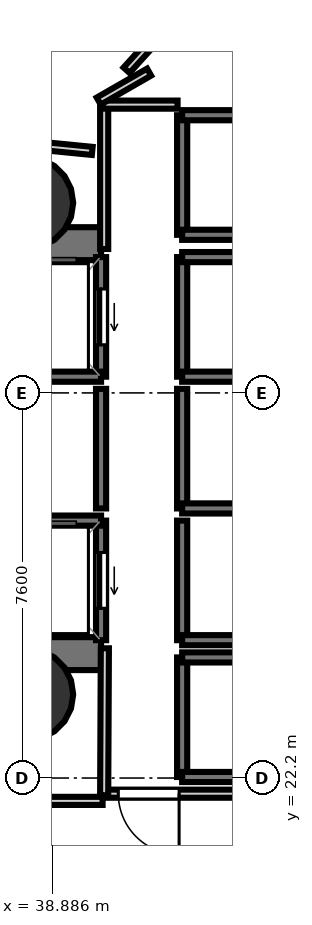
"""IFC4 building model, lengths in metres.
Left out: names, types, materials, properties, quantities, classifications, styles, units other than length and angle.
Written with IfcOpenShell. Run it as: python <this file> out.ifc"""

import sys

from ifc_helpers import new_model, si_unit, direction, frame, frame_2d, origin, origin_2d, place, context, subcontext, project, spatial, rectangle, hollow_circle, extrude, element, fill, save


model = new_model("IFC4")
c1 = context("Model", 3, precision=1e-05, world=origin(), true_north=direction((0.0, 1.0)))
c2 = subcontext(c1, "Body", "Model", "MODEL_VIEW")
j1 = project(units=[si_unit("LENGTHUNIT", "METRE"), si_unit("PLANEANGLEUNIT", "RADIAN")], contexts=[c1])
p1 = place(None, origin())
s1 = spatial("IfcSite", under=j1, at=p1, CompositionType="ELEMENT")
p2 = place(p1, origin())
s2 = spatial("IfcBuilding", under=s1, at=p2, CompositionType="ELEMENT")
p3 = place(p2, frame((0.0, 0.0, -10.0)))
s3 = spatial("IfcBuildingStorey", under=s2, at=p3, CompositionType="ELEMENT", Elevation=-10.0)
p4 = place(p3, frame((29.13, 32.745, 0.0), z_axis=(0.0, 0.0, 1.0), x_axis=(1.0, 0.0, 0.0)))
e1 = element("IfcWall", 1, at=p4, inside=s3, PredefinedType="SHEAR", context=c2, shape_type="SweptSolid", body=[
    extrude(rectangle(XDim=10.72, YDim=0.65, at=frame_2d((5.36, 0.0))), origin(), (0.0, 0.0, 1.0), 4.0),
])
p5 = place(p4, frame((1.095, 0.0, 0.0)))
e2 = element("IfcOpeningElement", 2, at=p5, cuts=e1, PredefinedType="OPENING", context=c2, shape_type="SweptSolid", body=[
    extrude(rectangle(XDim=1.25, YDim=2.15, at=frame_2d((0.625, 1.075))), frame((0.0, 0.335, 0.0), z_axis=(0.0, -1.0, 0.0), x_axis=(1.0, 0.0, 0.0)), (0.0, 0.0, 1.0), 0.67),
])
p6 = place(p3, frame((29.13, 24.655, 0.0), z_axis=(0.0, 0.0, 1.0), x_axis=(1.0, 0.0, 0.0)))
e3 = element("IfcWall", 3, at=p6, inside=s3, PredefinedType="SHEAR", context=c2, shape_type="SweptSolid", body=[
    extrude(rectangle(XDim=10.72, YDim=0.65, at=frame_2d((5.36, 0.0))), origin(), (0.0, 0.0, 1.0), 4.0),
])
p7 = place(p6, frame((0.895, 0.0, 0.0)))
e4 = element("IfcOpeningElement", 4, at=p7, cuts=e3, PredefinedType="OPENING", context=c2, shape_type="SweptSolid", body=[
    extrude(rectangle(XDim=1.25, YDim=2.15, at=frame_2d((0.625, 1.075))), frame((0.0, 0.335, 0.0), z_axis=(0.0, -1.0, 0.0), x_axis=(1.0, 0.0, 0.0)), (0.0, 0.0, 1.0), 0.67),
])
for number, where, z_axis, x_axis in (
    (5, (38.4, 33.55, 0.0), (0.0, 0.0, 1.0), (1.0, 0.0, 0.0)),
    (6, (38.4, 23.85, 0.0), (0.0, 0.0, 1.0), (1.0, 0.0, 0.0)),
):
    element("IfcColumn", number, at=place(p3, frame(where, z_axis=z_axis, x_axis=x_axis)), inside=s3, PredefinedType="COLUMN", context=c2, shape_type="SweptSolid", body=[
        extrude(hollow_circle(Radius=0.9, WallThickness=0.045, at=origin_2d()), origin(), (0.0, 0.0, 1.0), 4.4),
    ])
p8 = place(p3, frame((39.85, 30.12, 0.0), z_axis=(0.0, 0.0, 1.0), x_axis=(0.0, 1.0, 0.0)))
e7 = element("IfcWall", 7, at=p8, inside=s3, PredefinedType="SOLIDWALL", context=c2, shape_type="SweptSolid", body=[
    extrude(rectangle(XDim=2.36, YDim=0.2, at=frame_2d((1.18, 0.0))), origin(), (0.0, 0.0, 1.0), 4.0),
])
p9 = place(p8, frame((0.63, 0.0, 0.0)))
e8 = element("IfcOpeningElement", 8, at=p9, cuts=e7, PredefinedType="OPENING", context=c2, shape_type="SweptSolid", body=[
    extrude(rectangle(XDim=1.1, YDim=2.15, at=frame_2d((0.55, 1.075))), frame((0.0, 0.11, 0.0), z_axis=(0.0, -1.0, 0.0), x_axis=(1.0, 0.0, 0.0)), (0.0, 0.0, 1.0), 0.22),
])
p10 = place(p3, frame((37.75, 30.12, 0.0), z_axis=(0.0, 0.0, 1.0), x_axis=(1.0, 0.0, 0.0)))
e9 = element("IfcWall", 9, at=p10, inside=s3, PredefinedType="SOLIDWALL", context=c2, shape_type="SweptSolid", body=[
    extrude(rectangle(XDim=2.1, YDim=0.2, at=frame_2d((1.05, 0.0))), origin(), (0.0, 0.0, 1.0), 4.0),
])
p11 = place(p3, frame((39.85, 24.92, 0.0), z_axis=(0.0, 0.0, 1.0), x_axis=(0.0, 1.0, 0.0)))
e10 = element("IfcWall", 10, at=p11, inside=s3, PredefinedType="SOLIDWALL", context=c2, shape_type="SweptSolid", body=[
    extrude(rectangle(XDim=2.36, YDim=0.2, at=frame_2d((1.18, 0.0))), origin(), (0.0, 0.0, 1.0), 4.0),
])
p12 = place(p11, frame((0.63, 0.0, 0.0)))
e11 = element("IfcOpeningElement", 11, at=p12, cuts=e10, PredefinedType="OPENING", context=c2, shape_type="SweptSolid", body=[
    extrude(rectangle(XDim=1.1, YDim=2.15, at=frame_2d((0.55, 1.075))), frame((0.0, 0.11, 0.0), z_axis=(0.0, -1.0, 0.0), x_axis=(1.0, 0.0, 0.0)), (0.0, 0.0, 1.0), 0.22),
])
p13 = place(p3, frame((37.75, 27.28, 0.0), z_axis=(0.0, 0.0, 1.0), x_axis=(1.0, 0.0, 0.0)))
e12 = element("IfcWall", 12, at=p13, inside=s3, PredefinedType="SOLIDWALL", context=c2, shape_type="SweptSolid", body=[
    extrude(rectangle(XDim=2.1, YDim=0.2, at=frame_2d((1.05, 0.0))), origin(), (0.0, 0.0, 1.0), 4.0),
])
p14 = place(p3, frame((41.45, 30.12, 0.0), z_axis=(0.0, 0.0, 1.0), x_axis=(0.0, 1.0, 0.0)))
e13 = element("IfcWall", 13, at=p14, inside=s3, PredefinedType="SOLIDWALL", context=c2, shape_type="SweptSolid", body=[
    extrude(rectangle(XDim=2.36, YDim=0.2, at=frame_2d((1.18, 0.0))), origin(), (0.0, 0.0, 1.0), 4.0),
])
for number, where, z_axis, x_axis in (
    (14, (41.45, 32.48, 0.0), (0.0, 0.0, 1.0), (1.0, 0.0, 0.0)),
    (15, (41.45, 30.12, 0.0), (0.0, 0.0, 1.0), (1.0, 0.0, 0.0)),
):
    element("IfcWall", number, at=place(p3, frame(where, z_axis=z_axis, x_axis=x_axis)), inside=s3, PredefinedType="SOLIDWALL", context=c2, shape_type="SweptSolid", body=[
        extrude(rectangle(XDim=2.1, YDim=0.2, at=frame_2d((1.05, 0.0))), origin(), (0.0, 0.0, 1.0), 4.0),
    ])
p15 = place(p3, frame((41.45, 27.52, 0.0), z_axis=(0.0, 0.0, 1.0), x_axis=(0.0, 1.0, 0.0)))
e16 = element("IfcWall", 16, at=p15, inside=s3, PredefinedType="SOLIDWALL", context=c2, shape_type="SweptSolid", body=[
    extrude(rectangle(XDim=2.36, YDim=0.2, at=frame_2d((1.18, 0.0))), origin(), (0.0, 0.0, 1.0), 4.0),
])
p16 = place(p3, frame((41.45, 27.52, 0.0), z_axis=(0.0, 0.0, 1.0), x_axis=(1.0, 0.0, 0.0)))
e17 = element("IfcWall", 17, at=p16, inside=s3, PredefinedType="SOLIDWALL", context=c2, shape_type="SweptSolid", body=[
    extrude(rectangle(XDim=2.1, YDim=0.2, at=frame_2d((1.05, 0.0))), origin(), (0.0, 0.0, 1.0), 4.0),
])
p17 = place(p3, frame((41.45, 24.92, 0.0), z_axis=(0.0, 0.0, 1.0), x_axis=(0.0, 1.0, 0.0)))
e18 = element("IfcWall", 18, at=p17, inside=s3, PredefinedType="SOLIDWALL", context=c2, shape_type="SweptSolid", body=[
    extrude(rectangle(XDim=2.36, YDim=0.2, at=frame_2d((1.18, 0.0))), origin(), (0.0, 0.0, 1.0), 4.0),
])
p18 = place(p3, frame((41.45, 24.92, 0.0), z_axis=(0.0, 0.0, 1.0), x_axis=(1.0, 0.0, 0.0)))
e19 = element("IfcWall", 19, at=p18, inside=s3, PredefinedType="SOLIDWALL", context=c2, shape_type="SweptSolid", body=[
    extrude(rectangle(XDim=2.1, YDim=0.2, at=frame_2d((1.05, 0.0))), origin(), (0.0, 0.0, 1.0), 4.0),
])
p19 = place(p3, frame((39.85, 27.52, 0.0), z_axis=(0.0, 0.0, 1.0), x_axis=(0.0, 1.0, 0.0)))
e20 = element("IfcWall", 20, at=p19, inside=s3, PredefinedType="SOLIDWALL", context=c2, shape_type="SweptSolid", body=[
    extrude(rectangle(XDim=2.36, YDim=0.2, at=frame_2d((1.18, 0.0))), origin(), (0.0, 0.0, 1.0), 4.0),
])
p20 = place(p3, frame((41.45, 22.22, 0.0), z_axis=(0.0, 0.0, 1.0), x_axis=(0.0, 1.0, 0.0)))
e21 = element("IfcWall", 21, at=p20, inside=s3, PredefinedType="SOLIDWALL", context=c2, shape_type="SweptSolid", body=[
    extrude(rectangle(XDim=2.36, YDim=0.2, at=frame_2d((1.18, 0.0))), origin(), (0.0, 0.0, 1.0), 4.0),
])
for number, where, z_axis, x_axis in (
    (22, (41.45, 24.58, 0.0), (0.0, 0.0, 1.0), (1.0, 0.0, 0.0)),
    (23, (41.45, 22.22, 0.0), (0.0, 0.0, 1.0), (1.0, 0.0, 0.0)),
):
    element("IfcWall", number, at=place(p3, frame(where, z_axis=z_axis, x_axis=x_axis)), inside=s3, PredefinedType="SOLIDWALL", context=c2, shape_type="SweptSolid", body=[
        extrude(rectangle(XDim=2.1, YDim=0.2, at=frame_2d((1.05, 0.0))), origin(), (0.0, 0.0, 1.0), 4.0),
    ])
p21 = place(p3, frame((41.45, 32.92, 0.0), z_axis=(0.0, 0.0, 1.0), x_axis=(0.0, 1.0, 0.0)))
e24 = element("IfcWall", 24, at=p21, inside=s3, PredefinedType="SOLIDWALL", context=c2, shape_type="SweptSolid", body=[
    extrude(rectangle(XDim=2.36, YDim=0.2, at=frame_2d((1.18, 0.0))), origin(), (0.0, 0.0, 1.0), 4.0),
])
for number, where, z_axis, x_axis in (
    (25, (41.45, 35.28, 0.0), (0.0, 0.0, 1.0), (1.0, 0.0, 0.0)),
    (26, (41.45, 32.92, 0.0), (0.0, 0.0, 1.0), (1.0, 0.0, 0.0)),
):
    element("IfcWall", number, at=place(p3, frame(where, z_axis=z_axis, x_axis=x_axis)), inside=s3, PredefinedType="SOLIDWALL", context=c2, shape_type="SweptSolid", body=[
        extrude(rectangle(XDim=2.1, YDim=0.2, at=frame_2d((1.05, 0.0))), origin(), (0.0, 0.0, 1.0), 4.0),
    ])
p22 = place(p3, frame((39.911, 32.64, 0.0), z_axis=(0.0, 0.0, 1.0), x_axis=(0.0, 1.0, 0.0)))
e27 = element("IfcWall", 27, at=p22, inside=s3, PredefinedType="PARTITIONING", context=c2, shape_type="SweptSolid", body=[
    extrude(rectangle(XDim=2.88, YDim=0.16, at=frame_2d((1.44, 0.0))), origin(), (0.0, 0.0, 1.0), 3.32),
])
p23 = place(p3, frame((39.88, 35.489, 0.0), z_axis=(0.0, 0.0, 1.0), x_axis=(1.0, 0.0, 0.0)))
e28 = element("IfcWall", 28, at=p23, inside=s3, PredefinedType="PARTITIONING", context=c2, shape_type="SweptSolid", body=[
    extrude(rectangle(XDim=1.48, YDim=0.16, at=frame_2d((0.74, 0.0))), origin(), (0.0, 0.0, 1.0), 3.32),
])
p24 = place(p3, frame((43.1, 21.891, 0.0), z_axis=(0.0, 0.0, 1.0), x_axis=(-1.0, 0.0, 0.0)))
e29 = element("IfcWall", 29, at=p24, inside=s3, PredefinedType="PARTITIONING", context=c2, shape_type="SweptSolid", body=[
    extrude(rectangle(XDim=3.22, YDim=0.16, at=frame_2d((1.61, 0.0))), origin(), (0.0, 0.0, 1.0), 3.32),
])
p25 = place(p24, frame((1.71, 0.0, 0.0)))
e30 = element("IfcOpeningElement", 30, at=p25, cuts=e29, PredefinedType="OPENING", context=c2, shape_type="SweptSolid", body=[
    extrude(rectangle(XDim=1.2, YDim=2.15, at=frame_2d((0.6, 1.075))), frame((0.0, 0.09, 0.0), z_axis=(0.0, -1.0, 0.0), x_axis=(1.0, 0.0, 0.0)), (0.0, 0.0, 1.0), 0.18),
])
p26 = place(p3, frame((39.911, 21.86, 0.0), z_axis=(0.0, 0.0, 1.0), x_axis=(0.00479752075, 0.999988491831, 0.0)))
e31 = element("IfcWall", 31, at=p26, inside=s3, PredefinedType="PARTITIONING", context=c2, shape_type="SweptSolid", body=[
    extrude(rectangle(XDim=2.901, YDim=0.16, at=frame_2d((1.45, 0.0))), origin(), (0.0, 0.0, 1.0), 3.178),
])
p27 = place(p3, frame((41.167, 37.065, 0.0), z_axis=(0.0, 0.0, 1.0), x_axis=(-0.671477917818, -0.741024564966, 0.0)))
e32 = element("IfcWall", 32, at=p27, inside=s3, PredefinedType="PARTITIONING", context=c2, shape_type="SweptSolid", body=[
    extrude(rectangle(XDim=1.211, YDim=0.16, at=frame_2d((0.605, 0.0))), origin(), (0.0, 0.0, 1.0), 3.32),
])
p28 = place(p3, frame((40.798, 36.131, 0.0), z_axis=(0.0, 0.0, 1.0), x_axis=(-0.866890199367, -0.498499129629, 0.0)))
e33 = element("IfcWall", 33, at=p28, inside=s3, PredefinedType="PARTITIONING", context=c2, shape_type="SweptSolid", body=[
    extrude(rectangle(XDim=1.146, YDim=0.16, at=frame_2d((0.573, 0.0))), origin(), (0.0, 0.0, 1.0), 3.32),
])
p29 = place(p3, frame((39.676, 34.575, 0.0), z_axis=(0.0, 0.0, 1.0), x_axis=(-0.995186799139, 0.097996095944, 0.0)))
e34 = element("IfcWall", 34, at=p29, inside=s3, PredefinedType="PARTITIONING", context=c2, shape_type="SweptSolid", body=[
    extrude(rectangle(XDim=1.507, YDim=0.16, at=frame_2d((0.754, 0.0))), origin(), (0.0, 0.0, 1.0), 3.32),
])
p30 = place(p3, frame((33.45, 21.749, 0.0), z_axis=(0.0, 0.0, 1.0), x_axis=(1.0, 0.0, 0.0)))
e35 = element("IfcWall", 35, at=p30, inside=s3, PredefinedType="PARTITIONING", context=c2, shape_type="SweptSolid", body=[
    extrude(rectangle(XDim=6.43, YDim=0.16, at=frame_2d((3.215, 0.0))), origin(), (0.0, 0.0, 1.0), 3.32),
])
p31 = place(p9, origin())
e36 = element("IfcDoor", 36, at=p31, inside=s3, OperationType="SLIDING_TO_LEFT", PredefinedType="DOOR", context=c2, shape_type="SweptSolid", body=[
    extrude(rectangle(XDim=1.1, YDim=2.15, at=frame_2d((0.55, 1.075))), frame((0.0, 0.025, 0.0), z_axis=(0.0, -1.0, 0.0), x_axis=(1.0, 0.0, 0.0)), (0.0, 0.0, 1.0), 0.05),
])
fill(e8, e36)
p32 = place(p12, origin())
e37 = element("IfcDoor", 37, at=p32, inside=s3, OperationType="SLIDING_TO_LEFT", PredefinedType="DOOR", context=c2, shape_type="SweptSolid", body=[
    extrude(rectangle(XDim=1.1, YDim=2.15, at=frame_2d((0.55, 1.075))), frame((0.0, 0.025, 0.0), z_axis=(0.0, -1.0, 0.0), x_axis=(1.0, 0.0, 0.0)), (0.0, 0.0, 1.0), 0.05),
])
fill(e11, e37)
p33 = place(p25, origin())
e38 = element("IfcDoor", 38, at=p33, inside=s3, OperationType="SINGLE_SWING_LEFT", PredefinedType="DOOR", context=c2, shape_type="SweptSolid", body=[
    extrude(rectangle(XDim=1.2, YDim=2.15, at=frame_2d((0.6, 1.075))), frame((0.0, 0.025, 0.0), z_axis=(0.0, -1.0, 0.0), x_axis=(1.0, 0.0, 0.0)), (0.0, 0.0, 1.0), 0.05),
])
fill(e30, e38)
save(model, sys.argv[1])
